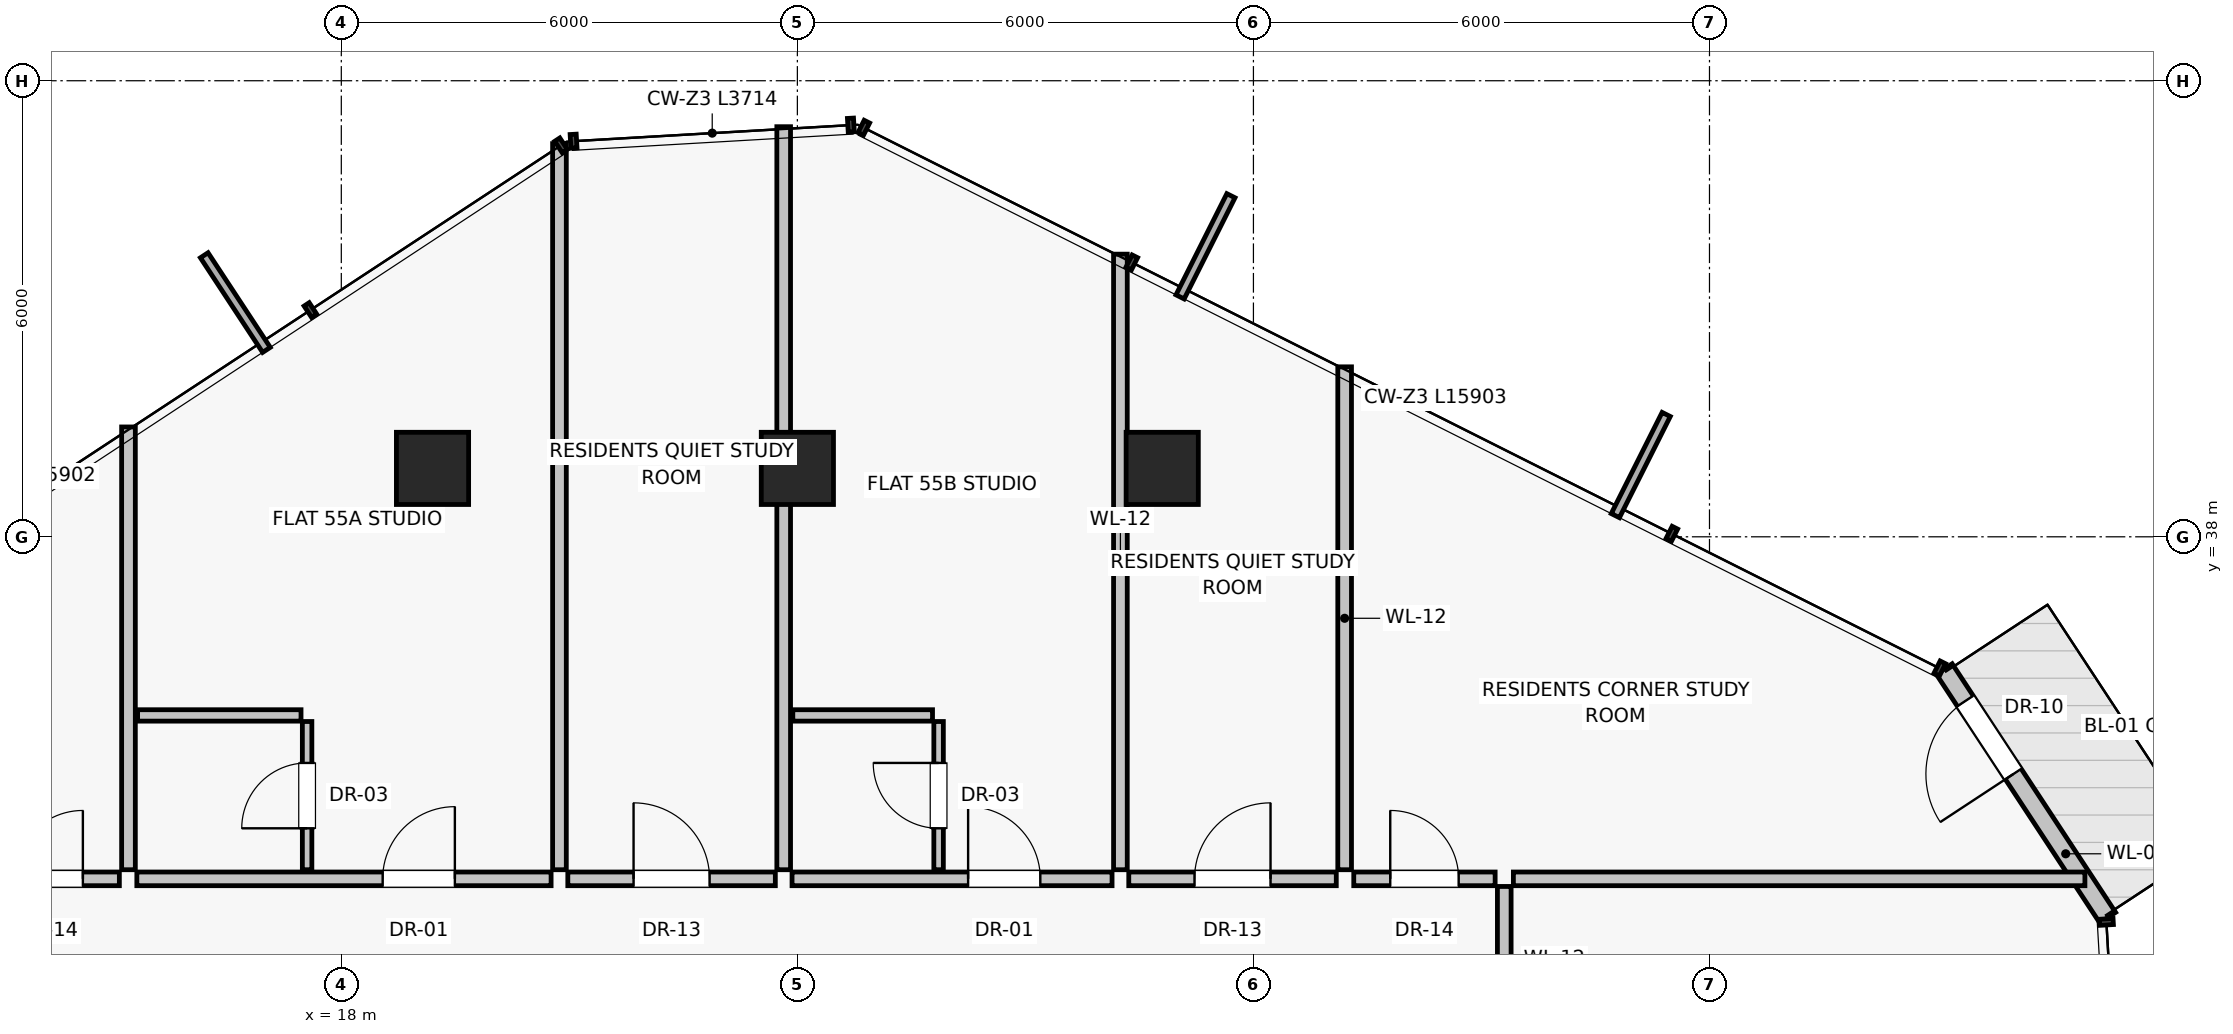
"""IFC4 building model, lengths in metres.
Left out: names, types, materials, properties, quantities, classifications, styles, units other than length and angle.
Written with IfcOpenShell. Run it as: python <this file> out.ifc"""

import sys

from ifc_helpers import new_model, si_unit, direction, frame, frame_2d, origin, origin_2d, place, context, subcontext, project, spatial, rectangle, extrude, source, transform, mapped, element, fill, save


model = new_model("IFC4")
c1 = context("Model", 3, precision=1e-05, world=origin(), true_north=direction((0.0, 1.0)))
c2 = subcontext(c1, "Body", "Model", "MODEL_VIEW")
j1 = project(units=[si_unit("LENGTHUNIT", "METRE"), si_unit("PLANEANGLEUNIT", "RADIAN")], contexts=[c1])
p1 = place(None, origin())
s1 = spatial("IfcSite", under=j1, at=p1, CompositionType="ELEMENT")
p2 = place(p1, origin())
s2 = spatial("IfcBuilding", under=s1, at=p2, CompositionType="ELEMENT")
p3 = place(p2, frame((0.0, 0.0, 195.1)))
s3 = spatial("IfcBuildingStorey", under=s2, at=p3, CompositionType="ELEMENT", Elevation=195.1)
for number, where, z_axis, x_axis in (
    (1, (28.8, 38.9, 0.0), (0.0, 0.0, 1.0), (1.0, 0.0, 0.0)),
    (2, (24.0, 38.9, 0.0), (0.0, 0.0, 1.0), (1.0, 0.0, 0.0)),
    (3, (19.2, 38.9, 0.0), (0.0, 0.0, 1.0), (1.0, 0.0, 0.0)),
):
    element("IfcColumn", number, at=place(p3, frame(where, z_axis=z_axis, x_axis=x_axis)), inside=s3, PredefinedType="COLUMN", context=c2, shape_type="SweptSolid", body=[
        extrude(rectangle(XDim=0.95, YDim=0.95, at=origin_2d()), origin(), (0.0, 0.0, 1.0), 3.25),
    ])
p4 = place(p3, frame((41.239, 32.99, 0.0), z_axis=(0.0, 0.0, 1.0), x_axis=(-0.549291135851, 0.835631047817, 0.0)))
e4 = element("IfcWall", 4, at=p4, inside=s3, PredefinedType="SOLIDWALL", context=c2, shape_type="SweptSolid", body=[
    extrude(rectangle(XDim=3.914, YDim=0.25, at=frame_2d((1.957, 0.0))), origin(), (0.0, 0.0, 1.0), 3.015),
])
p5 = place(p4, frame((2.26, 0.0, 0.0)))
e5 = element("IfcOpeningElement", 5, at=p5, cuts=e4, PredefinedType="OPENING", context=c2, shape_type="SweptSolid", body=[
    extrude(rectangle(XDim=1.15, YDim=2.25, at=frame_2d((0.575, 1.125))), frame((0.0, 0.135, 0.0), z_axis=(0.0, -1.0, 0.0), x_axis=(1.0, 0.0, 0.0)), (0.0, 0.0, 1.0), 0.27),
])
p6 = place(p3, frame((15.2, 33.62, 0.0), z_axis=(0.0, 0.0, 1.0), x_axis=(0.0, 1.0, 0.0)))
e6 = element("IfcWall", 6, at=p6, inside=s3, PredefinedType="PARTITIONING", context=c2, shape_type="SweptSolid", body=[
    extrude(rectangle(XDim=5.825, YDim=0.18, at=frame_2d((2.913, 0.0))), origin(), (0.0, 0.0, 1.0), 3.015),
])
p7 = place(p3, frame((31.2, 33.62, 0.0), z_axis=(0.0, 0.0, 1.0), x_axis=(0.0, 1.0, 0.0)))
e7 = element("IfcWall", 7, at=p7, inside=s3, PredefinedType="PARTITIONING", context=c2, shape_type="SweptSolid", body=[
    extrude(rectangle(XDim=6.616, YDim=0.18, at=frame_2d((3.308, 0.0))), origin(), (0.0, 0.0, 1.0), 3.015),
])
p8 = place(p3, frame((20.98, 33.5, 0.0), z_axis=(0.0, 0.0, 1.0), x_axis=(1.0, 0.0, 0.0)))
e8 = element("IfcWall", 8, at=p8, inside=s3, PredefinedType="PARTITIONING", context=c2, shape_type="SweptSolid", body=[
    extrude(rectangle(XDim=2.73, YDim=0.18, at=frame_2d((1.365, 0.0))), origin(), (0.0, 0.0, 1.0), 3.015),
])
p9 = place(p8, frame((0.865, 0.0, 0.0)))
e9 = element("IfcOpeningElement", 9, at=p9, cuts=e8, PredefinedType="OPENING", context=c2, shape_type="SweptSolid", body=[
    extrude(rectangle(XDim=1.0, YDim=2.01, at=frame_2d((0.5, 1.005))), frame((0.0, 0.1, 0.0), z_axis=(0.0, -1.0, 0.0), x_axis=(1.0, 0.0, 0.0)), (0.0, 0.0, 1.0), 0.2),
])
p10 = place(p3, frame((20.87, 33.62, 0.0), z_axis=(0.0, 0.0, 1.0), x_axis=(0.0, 1.0, 0.0)))
e10 = element("IfcWall", 10, at=p10, inside=s3, PredefinedType="PARTITIONING", context=c2, shape_type="SweptSolid", body=[
    extrude(rectangle(XDim=9.552, YDim=0.18, at=frame_2d((4.776, 0.0))), origin(), (0.0, 0.0, 1.0), 3.015),
])
p11 = place(p3, frame((15.31, 33.5, 0.0), z_axis=(0.0, 0.0, 1.0), x_axis=(1.0, 0.0, 0.0)))
e11 = element("IfcWall", 11, at=p11, inside=s3, PredefinedType="PARTITIONING", context=c2, shape_type="SweptSolid", body=[
    extrude(rectangle(XDim=5.45, YDim=0.18, at=frame_2d((2.725, 0.0))), origin(), (0.0, 0.0, 1.0), 3.015),
])
p12 = place(p11, frame((3.234, 0.0, 0.0)))
e12 = element("IfcOpeningElement", 12, at=p12, cuts=e11, PredefinedType="OPENING", context=c2, shape_type="SweptSolid", body=[
    extrude(rectangle(XDim=0.95, YDim=2.02, at=frame_2d((0.475, 1.01))), frame((0.0, 0.1, 0.0), z_axis=(0.0, -1.0, 0.0), x_axis=(1.0, 0.0, 0.0)), (0.0, 0.0, 1.0), 0.2),
])
p13 = place(p3, frame((17.55, 33.62, 0.0), z_axis=(0.0, 0.0, 1.0), x_axis=(0.0, 1.0, 0.0)))
e13 = element("IfcWall", 13, at=p13, inside=s3, PredefinedType="PARTITIONING", context=c2, shape_type="SweptSolid", body=[
    extrude(rectangle(XDim=1.95, YDim=0.125, at=frame_2d((0.975, 0.0))), origin(), (0.0, 0.0, 1.0), 3.015),
])
p14 = place(p13, frame((0.545, 0.0, 0.0)))
e14 = element("IfcOpeningElement", 14, at=p14, cuts=e13, PredefinedType="OPENING", context=c2, shape_type="SweptSolid", body=[
    extrude(rectangle(XDim=0.86, YDim=2.01, at=frame_2d((0.43, 1.005))), frame((0.0, 0.073, 0.0), z_axis=(0.0, -1.0, 0.0), x_axis=(1.0, 0.0, 0.0)), (0.0, 0.0, 1.0), 0.145),
])
p15 = place(p3, frame((15.32, 35.65, 0.0), z_axis=(0.0, 0.0, 1.0), x_axis=(1.0, 0.0, 0.0)))
e15 = element("IfcWall", 15, at=p15, inside=s3, PredefinedType="PARTITIONING", context=c2, shape_type="SweptSolid", body=[
    extrude(rectangle(XDim=2.15, YDim=0.15, at=frame_2d((1.075, 0.0))), origin(), (0.0, 0.0, 1.0), 3.015),
])
p16 = place(p3, frame((23.82, 33.62, 0.0), z_axis=(0.0, 0.0, 1.0), x_axis=(0.0, 1.0, 0.0)))
e16 = element("IfcWall", 16, at=p16, inside=s3, PredefinedType="PARTITIONING", context=c2, shape_type="SweptSolid", body=[
    extrude(rectangle(XDim=9.775, YDim=0.18, at=frame_2d((4.888, 0.0))), origin(), (0.0, 0.0, 1.0), 3.015),
])
p17 = place(p3, frame((28.36, 33.5, 0.0), z_axis=(0.0, 0.0, 1.0), x_axis=(1.0, 0.0, 0.0)))
e17 = element("IfcWall", 17, at=p17, inside=s3, PredefinedType="PARTITIONING", context=c2, shape_type="SweptSolid", body=[
    extrude(rectangle(XDim=2.73, YDim=0.18, at=frame_2d((1.365, 0.0))), origin(), (0.0, 0.0, 1.0), 3.015),
])
p18 = place(p17, frame((0.865, 0.0, 0.0)))
e18 = element("IfcOpeningElement", 18, at=p18, cuts=e17, PredefinedType="OPENING", context=c2, shape_type="SweptSolid", body=[
    extrude(rectangle(XDim=1.0, YDim=2.01, at=frame_2d((0.5, 1.005))), frame((0.0, 0.1, 0.0), z_axis=(0.0, -1.0, 0.0), x_axis=(1.0, 0.0, 0.0)), (0.0, 0.0, 1.0), 0.2),
])
p19 = place(p3, frame((28.25, 33.62, 0.0), z_axis=(0.0, 0.0, 1.0), x_axis=(0.0, 1.0, 0.0)))
e19 = element("IfcWall", 19, at=p19, inside=s3, PredefinedType="PARTITIONING", context=c2, shape_type="SweptSolid", body=[
    extrude(rectangle(XDim=8.098, YDim=0.18, at=frame_2d((4.049, 0.0))), origin(), (0.0, 0.0, 1.0), 2.469),
])
p20 = place(p3, frame((23.93, 33.5, 0.0), z_axis=(0.0, 0.0, 1.0), x_axis=(1.0, 0.0, 0.0)))
e20 = element("IfcWall", 20, at=p20, inside=s3, PredefinedType="PARTITIONING", context=c2, shape_type="SweptSolid", body=[
    extrude(rectangle(XDim=4.21, YDim=0.18, at=frame_2d((2.105, 0.0))), origin(), (0.0, 0.0, 1.0), 3.015),
])
p21 = place(p20, frame((2.316, 0.0, 0.0)))
e21 = element("IfcOpeningElement", 21, at=p21, cuts=e20, PredefinedType="OPENING", context=c2, shape_type="SweptSolid", body=[
    extrude(rectangle(XDim=0.95, YDim=2.02, at=frame_2d((0.475, 1.01))), frame((0.0, 0.1, 0.0), z_axis=(0.0, -1.0, 0.0), x_axis=(1.0, 0.0, 0.0)), (0.0, 0.0, 1.0), 0.2),
])
p22 = place(p3, frame((25.858, 33.62, 0.0), z_axis=(0.0, 0.0, 1.0), x_axis=(0.0, 1.0, 0.0)))
e22 = element("IfcWall", 22, at=p22, inside=s3, PredefinedType="PARTITIONING", context=c2, shape_type="SweptSolid", body=[
    extrude(rectangle(XDim=1.95, YDim=0.125, at=frame_2d((0.975, 0.0))), origin(), (0.0, 0.0, 1.0), 3.015),
])
p23 = place(p22, frame((0.545, 0.0, 0.0)))
e23 = element("IfcOpeningElement", 23, at=p23, cuts=e22, PredefinedType="OPENING", context=c2, shape_type="SweptSolid", body=[
    extrude(rectangle(XDim=0.86, YDim=2.01, at=frame_2d((0.43, 1.005))), frame((0.0, 0.073, 0.0), z_axis=(0.0, -1.0, 0.0), x_axis=(1.0, 0.0, 0.0)), (0.0, 0.0, 1.0), 0.145),
])
p24 = place(p3, frame((23.94, 35.65, 0.0), z_axis=(0.0, 0.0, 1.0), x_axis=(1.0, 0.0, 0.0)))
e24 = element("IfcWall", 24, at=p24, inside=s3, PredefinedType="PARTITIONING", context=c2, shape_type="SweptSolid", body=[
    extrude(rectangle(XDim=1.838, YDim=0.15, at=frame_2d((0.919, 0.0))), origin(), (0.0, 0.0, 1.0), 2.662),
])
p25 = place(p3, frame((33.3, 31.5, 0.0), z_axis=(0.0, 0.0, 1.0), x_axis=(0.0, 1.0, 0.0)))
e25 = element("IfcWall", 25, at=p25, inside=s3, PredefinedType="PARTITIONING", context=c2, shape_type="SweptSolid", body=[
    extrude(rectangle(XDim=1.9, YDim=0.18, at=frame_2d((0.95, 0.0))), origin(), (0.0, 0.0, 1.0), 3.015),
])
p26 = place(p3, frame((13.22, 33.5, 0.0), z_axis=(0.0, 0.0, 1.0), x_axis=(1.0, 0.0, 0.0)))
e26 = element("IfcWall", 26, at=p26, inside=s3, PredefinedType="PARTITIONING", context=c2, shape_type="SweptSolid", body=[
    extrude(rectangle(XDim=1.86, YDim=0.18, at=frame_2d((0.93, 0.0))), origin(), (0.0, 0.0, 1.0), 3.015),
])
p27 = place(p26, frame((0.48, 0.0, 0.0)))
e27 = element("IfcOpeningElement", 27, at=p27, cuts=e26, PredefinedType="OPENING", context=c2, shape_type="SweptSolid", body=[
    extrude(rectangle(XDim=0.9, YDim=2.01, at=frame_2d((0.45, 1.005))), frame((0.0, 0.1, 0.0), z_axis=(0.0, -1.0, 0.0), x_axis=(1.0, 0.0, 0.0)), (0.0, 0.0, 1.0), 0.2),
])
p28 = place(p3, frame((33.42, 33.5, 0.0), z_axis=(0.0, 0.0, 1.0), x_axis=(1.0, 0.0, 0.0)))
e28 = element("IfcWall", 28, at=p28, inside=s3, PredefinedType="PARTITIONING", context=c2, shape_type="SweptSolid", body=[
    extrude(rectangle(XDim=7.519, YDim=0.18, at=frame_2d((3.76, 0.0))), origin(), (0.0, 0.0, 1.0), 3.015),
])
p29 = place(p3, frame((31.32, 33.5, 0.0), z_axis=(0.0, 0.0, 1.0), x_axis=(1.0, 0.0, 0.0)))
e29 = element("IfcWall", 29, at=p29, inside=s3, PredefinedType="PARTITIONING", context=c2, shape_type="SweptSolid", body=[
    extrude(rectangle(XDim=1.86, YDim=0.18, at=frame_2d((0.93, 0.0))), origin(), (0.0, 0.0, 1.0), 3.015),
])
p30 = place(p29, frame((0.48, 0.0, 0.0)))
e30 = element("IfcOpeningElement", 30, at=p30, cuts=e29, PredefinedType="OPENING", context=c2, shape_type="SweptSolid", body=[
    extrude(rectangle(XDim=0.9, YDim=2.01, at=frame_2d((0.45, 1.005))), frame((0.0, 0.1, 0.0), z_axis=(0.0, -1.0, 0.0), x_axis=(1.0, 0.0, 0.0)), (0.0, 0.0, 1.0), 0.2),
])
m1 = source(origin(), c2, "Body", "SweptSolid", [
    extrude(rectangle(XDim=1.15, YDim=2.25, at=frame_2d((0.575, 1.125))), frame((0.0, 0.025, 0.0), z_axis=(0.0, -1.0, 0.0), x_axis=(1.0, 0.0, 0.0)), (0.0, 0.0, 1.0), 0.05),
])
p31 = place(p5, frame((1.15, 0.0, 0.0), z_axis=(0.0, 0.0, 1.0), x_axis=(-1.0, 0.0, 0.0)))
e31 = element("IfcDoor", 31, at=p31, inside=s3, OperationType="SINGLE_SWING_LEFT", PredefinedType="DOOR", context=c2, shape_type="MappedRepresentation", body=[
    mapped(m1, transform((0.0, 0.0, 0.0), scale=1.0)),
])
fill(e5, e31)
m2 = source(origin(), c2, "Body", "SweptSolid", [
    extrude(rectangle(XDim=1.0, YDim=2.01, at=frame_2d((0.5, 1.005))), frame((0.0, 0.025, 0.0), z_axis=(0.0, -1.0, 0.0), x_axis=(1.0, 0.0, 0.0)), (0.0, 0.0, 1.0), 0.05),
])
p32 = place(p9, origin())
e32 = element("IfcDoor", 32, at=p32, inside=s3, OperationType="SINGLE_SWING_LEFT", PredefinedType="DOOR", context=c2, shape_type="MappedRepresentation", body=[
    mapped(m2, transform((0.0, 0.0, 0.0), scale=1.0)),
])
fill(e9, e32)
m3 = source(origin(), c2, "Body", "SweptSolid", [
    extrude(rectangle(XDim=0.95, YDim=2.02, at=frame_2d((0.475, 1.01))), frame((0.0, 0.025, 0.0), z_axis=(0.0, -1.0, 0.0), x_axis=(1.0, 0.0, 0.0)), (0.0, 0.0, 1.0), 0.05),
])
p33 = place(p12, origin())
e33 = element("IfcDoor", 33, at=p33, inside=s3, OperationType="SINGLE_SWING_RIGHT", PredefinedType="DOOR", context=c2, shape_type="MappedRepresentation", body=[
    mapped(m3, transform((0.0, 0.0, 0.0), scale=1.0)),
])
fill(e12, e33)
m4 = source(origin(), c2, "Body", "SweptSolid", [
    extrude(rectangle(XDim=0.86, YDim=2.01, at=frame_2d((0.43, 1.005))), frame((0.0, 0.025, 0.0), z_axis=(0.0, -1.0, 0.0), x_axis=(1.0, 0.0, 0.0)), (0.0, 0.0, 1.0), 0.05),
])
p34 = place(p14, origin())
e34 = element("IfcDoor", 34, at=p34, inside=s3, OperationType="SINGLE_SWING_LEFT", PredefinedType="DOOR", context=c2, shape_type="MappedRepresentation", body=[
    mapped(m4, transform((0.0, 0.0, 0.0), scale=1.0)),
])
fill(e14, e34)
p35 = place(p18, origin())
e35 = element("IfcDoor", 35, at=p35, inside=s3, OperationType="SINGLE_SWING_RIGHT", PredefinedType="DOOR", context=c2, shape_type="MappedRepresentation", body=[
    mapped(m2, transform((0.0, 0.0, 0.0), scale=1.0)),
])
fill(e18, e35)
p36 = place(p21, origin())
e36 = element("IfcDoor", 36, at=p36, inside=s3, OperationType="SINGLE_SWING_LEFT", PredefinedType="DOOR", context=c2, shape_type="MappedRepresentation", body=[
    mapped(m3, transform((0.0, 0.0, 0.0), scale=1.0)),
])
fill(e21, e36)
p37 = place(p23, origin())
e37 = element("IfcDoor", 37, at=p37, inside=s3, OperationType="SINGLE_SWING_RIGHT", PredefinedType="DOOR", context=c2, shape_type="MappedRepresentation", body=[
    mapped(m4, transform((0.0, 0.0, 0.0), scale=1.0)),
])
fill(e23, e37)
m5 = source(origin(), c2, "Body", "SweptSolid", [
    extrude(rectangle(XDim=0.9, YDim=2.01, at=frame_2d((0.45, 1.005))), frame((0.0, 0.025, 0.0), z_axis=(0.0, -1.0, 0.0), x_axis=(1.0, 0.0, 0.0)), (0.0, 0.0, 1.0), 0.05),
])
p38 = place(p27, origin())
e38 = element("IfcDoor", 38, at=p38, inside=s3, OperationType="SINGLE_SWING_RIGHT", PredefinedType="DOOR", context=c2, shape_type="MappedRepresentation", body=[
    mapped(m5, transform((0.0, 0.0, 0.0), scale=1.0)),
])
fill(e27, e38)
p39 = place(p30, origin())
e39 = element("IfcDoor", 39, at=p39, inside=s3, OperationType="SINGLE_SWING_LEFT", PredefinedType="DOOR", context=c2, shape_type="MappedRepresentation", body=[
    mapped(m5, transform((0.0, 0.0, 0.0), scale=1.0)),
])
fill(e30, e39)
save(model, sys.argv[1])
